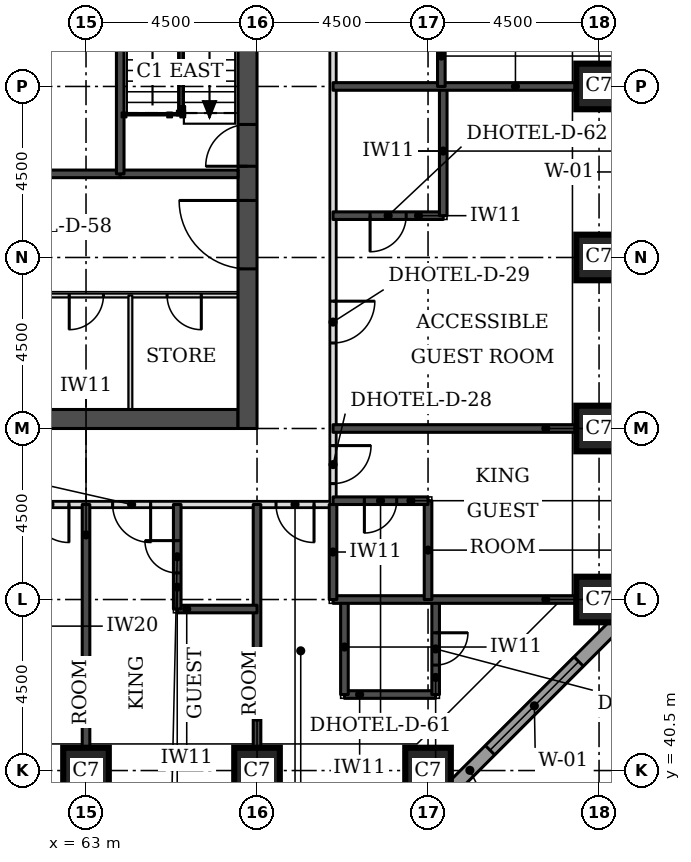
"""IFC4 building model, lengths in metres.
Left out: names, types, materials, properties, quantities, classifications, styles, units other than length and angle.
Written with IfcOpenShell. Run it as: python <this file> out.ifc"""

import sys

from ifc_helpers import new_model, si_unit, direction, frame, frame_2d, origin, origin_2d, place, context, subcontext, project, spatial, rectangle, extrude, element, fill, save


model = new_model("IFC4")
c1 = context("Model", 3, precision=1e-05, world=origin(), true_north=direction((0.0, 1.0)))
c2 = subcontext(c1, "Body", "Model", "MODEL_VIEW")
j1 = project(units=[si_unit("LENGTHUNIT", "METRE"), si_unit("PLANEANGLEUNIT", "RADIAN")], contexts=[c1])
p1 = place(None, origin())
s1 = spatial("IfcSite", under=j1, at=p1, CompositionType="ELEMENT")
p2 = place(p1, origin())
s2 = spatial("IfcBuilding", under=s1, at=p2, CompositionType="ELEMENT")
p3 = place(p2, frame((0.0, 0.0, 59.4)))
s3 = spatial("IfcBuildingStorey", under=s2, at=p3, CompositionType="ELEMENT", Elevation=59.4)
for number, where, z_axis, x_axis in (
    (1, (63.0, 40.5, 0.0), (0.0, 0.0, 1.0), (1.0, 0.0, 0.0)),
    (2, (67.5, 40.5, 0.0), (0.0, 0.0, 1.0), (1.0, 0.0, 0.0)),
    (3, (72.0, 40.5, 0.0), (0.0, 0.0, 1.0), (1.0, 0.0, 0.0)),
    (4, (76.5, 45.0, 0.0), (0.0, 0.0, 1.0), (1.0, 0.0, 0.0)),
    (5, (76.5, 49.5, 0.0), (0.0, 0.0, 1.0), (1.0, 0.0, 0.0)),
    (6, (76.5, 54.0, 0.0), (0.0, 0.0, 1.0), (1.0, 0.0, 0.0)),
    (7, (76.5, 58.5, 0.0), (0.0, 0.0, 1.0), (1.0, 0.0, 0.0)),
):
    element("IfcColumn", number, at=place(p3, frame(where, z_axis=z_axis, x_axis=x_axis)), inside=s3, PredefinedType="COLUMN", context=c2, shape_type="SweptSolid", body=[
        extrude(rectangle(XDim=1.2, YDim=1.2, at=origin_2d()), origin(), (0.0, 0.0, 1.0), 3.3),
    ])
p4 = place(p3, frame((45.5, 49.75, 0.0), z_axis=(0.0, 0.0, 1.0), x_axis=(1.0, 0.0, 0.0)))
e8 = element("IfcWall", 8, at=p4, inside=s3, PredefinedType="SHEAR", context=c2, shape_type="SweptSolid", body=[
    extrude(rectangle(XDim=21.5, YDim=0.5, at=frame_2d((10.75, 0.0))), origin(), (0.0, 0.0, 1.0), 3.3),
])
p5 = place(p3, frame((67.25, 49.5, 0.0), z_axis=(0.0, 0.0, 1.0), x_axis=(0.0, 1.0, 0.0)))
e9 = element("IfcWall", 9, at=p5, inside=s3, PredefinedType="SHEAR", context=c2, shape_type="SweptSolid", body=[
    extrude(rectangle(XDim=22.5, YDim=0.5, at=frame_2d((11.25, 0.0))), origin(), (0.0, 0.0, 1.0), 3.3),
])
p6 = place(p5, frame((4.2, 0.0, 0.0)))
e10 = element("IfcOpeningElement", 10, at=p6, cuts=e9, PredefinedType="OPENING", context=c2, shape_type="SweptSolid", body=[
    extrude(rectangle(XDim=1.8, YDim=2.1, at=frame_2d((0.9, 1.05))), frame((0.0, 0.26, 0.0), z_axis=(0.0, -1.0, 0.0), x_axis=(1.0, 0.0, 0.0)), (0.0, 0.0, 1.0), 0.52),
])
p7 = place(p5, frame((6.9, 0.0, 0.0)))
e11 = element("IfcOpeningElement", 11, at=p7, cuts=e9, PredefinedType="OPENING", context=c2, shape_type="SweptSolid", body=[
    extrude(rectangle(XDim=1.1, YDim=2.1, at=frame_2d((0.55, 1.05))), frame((0.0, 0.26, 0.0), z_axis=(0.0, -1.0, 0.0), x_axis=(1.0, 0.0, 0.0)), (0.0, 0.0, 1.0), 0.52),
])
p8 = place(p5, frame((13.6, 0.0, 0.0)))
e12 = element("IfcOpeningElement", 12, at=p8, cuts=e9, PredefinedType="OPENING", context=c2, shape_type="SweptSolid", body=[
    extrude(rectangle(XDim=1.1, YDim=2.1, at=frame_2d((0.55, 1.05))), frame((0.0, 0.26, 0.0), z_axis=(0.0, -1.0, 0.0), x_axis=(1.0, 0.0, 0.0)), (0.0, 0.0, 1.0), 0.52),
])
p9 = place(p5, frame((16.5, 0.0, 0.0)))
e13 = element("IfcOpeningElement", 13, at=p9, cuts=e9, PredefinedType="OPENING", context=c2, shape_type="SweptSolid", body=[
    extrude(rectangle(XDim=1.8, YDim=2.1, at=frame_2d((0.9, 1.05))), frame((0.0, 0.26, 0.0), z_axis=(0.0, -1.0, 0.0), x_axis=(1.0, 0.0, 0.0)), (0.0, 0.0, 1.0), 0.52),
])
p10 = place(p3, frame((72.27, 39.674, 0.0), z_axis=(0.0, 0.0, 1.0), x_axis=(0.707106781187, 0.707106781187, 0.0)))
e14 = element("IfcWall", 14, at=p10, inside=s3, PredefinedType="STANDARD", context=c2, shape_type="SweptSolid", body=[
    extrude(rectangle(XDim=7.151, YDim=0.35, at=frame_2d((3.576, 0.0))), origin(), (0.0, 0.0, 1.0), 3.055),
])
p11 = place(p10, frame((1.926, 0.0, 0.8)))
e15 = element("IfcOpeningElement", 15, at=p11, cuts=e14, PredefinedType="OPENING", context=c2, shape_type="SweptSolid", body=[
    extrude(rectangle(XDim=3.3, YDim=1.5, at=frame_2d((1.65, 0.75))), frame((0.0, 0.185, 0.0), z_axis=(0.0, -1.0, 0.0), x_axis=(1.0, 0.0, 0.0)), (0.0, 0.0, 1.0), 0.37),
])
p12 = place(p3, frame((51.5, 47.5, 0.0), z_axis=(0.0, 0.0, 1.0), x_axis=(1.0, 0.0, 0.0)))
e16 = element("IfcWall", 16, at=p12, inside=s3, PredefinedType="PARTITIONING", context=c2, shape_type="SweptSolid", body=[
    extrude(rectangle(XDim=18.0, YDim=0.15, at=frame_2d((9.0, 0.0))), origin(), (0.0, 0.0, 1.0), 3.08),
])
p13 = place(p12, frame((12.2, 0.0, 0.0)))
e17 = element("IfcOpeningElement", 17, at=p13, cuts=e16, PredefinedType="OPENING", context=c2, shape_type="SweptSolid", body=[
    extrude(rectangle(XDim=1.0, YDim=2.1, at=frame_2d((0.5, 1.05))), frame((0.0, 0.085, 0.0), z_axis=(0.0, -1.0, 0.0), x_axis=(1.0, 0.0, 0.0)), (0.0, 0.0, 1.0), 0.17),
])
p14 = place(p12, frame((10.05, 0.0, 0.0)))
e18 = element("IfcOpeningElement", 18, at=p14, cuts=e16, PredefinedType="OPENING", context=c2, shape_type="SweptSolid", body=[
    extrude(rectangle(XDim=1.0, YDim=2.1, at=frame_2d((0.5, 1.05))), frame((0.0, 0.085, 0.0), z_axis=(0.0, -1.0, 0.0), x_axis=(1.0, 0.0, 0.0)), (0.0, 0.0, 1.0), 0.17),
])
p15 = place(p12, frame((16.5, 0.0, 0.0)))
e19 = element("IfcOpeningElement", 19, at=p15, cuts=e16, PredefinedType="OPENING", context=c2, shape_type="SweptSolid", body=[
    extrude(rectangle(XDim=1.0, YDim=2.1, at=frame_2d((0.5, 1.05))), frame((0.0, 0.085, 0.0), z_axis=(0.0, -1.0, 0.0), x_axis=(1.0, 0.0, 0.0)), (0.0, 0.0, 1.0), 0.17),
])
p16 = place(p3, frame((69.5, 47.5, 0.0), z_axis=(0.0, 0.0, 1.0), x_axis=(0.0, 1.0, 0.0)))
e20 = element("IfcWall", 20, at=p16, inside=s3, PredefinedType="PARTITIONING", context=c2, shape_type="SweptSolid", body=[
    extrude(rectangle(XDim=26.5, YDim=0.15, at=frame_2d((13.25, 0.0))), origin(), (0.0, 0.0, 1.0), 3.08),
])
p17 = place(p16, frame((22.65, 0.0, 0.0)))
e21 = element("IfcOpeningElement", 21, at=p17, cuts=e20, PredefinedType="OPENING", context=c2, shape_type="SweptSolid", body=[
    extrude(rectangle(XDim=1.0, YDim=2.1, at=frame_2d((0.5, 1.05))), frame((0.0, 0.085, 0.0), z_axis=(0.0, -1.0, 0.0), x_axis=(1.0, 0.0, 0.0)), (0.0, 0.0, 1.0), 0.17),
])
p18 = place(p16, frame((16.6, 0.0, 0.0)))
e22 = element("IfcOpeningElement", 22, at=p18, cuts=e20, PredefinedType="OPENING", context=c2, shape_type="SweptSolid", body=[
    extrude(rectangle(XDim=1.0, YDim=2.1, at=frame_2d((0.5, 1.05))), frame((0.0, 0.085, 0.0), z_axis=(0.0, -1.0, 0.0), x_axis=(1.0, 0.0, 0.0)), (0.0, 0.0, 1.0), 0.17),
])
p19 = place(p16, frame((4.25, 0.0, 0.0)))
e23 = element("IfcOpeningElement", 23, at=p19, cuts=e20, PredefinedType="OPENING", context=c2, shape_type="SweptSolid", body=[
    extrude(rectangle(XDim=1.1, YDim=2.1, at=frame_2d((0.55, 1.05))), frame((0.0, 0.085, 0.0), z_axis=(0.0, -1.0, 0.0), x_axis=(1.0, 0.0, 0.0)), (0.0, 0.0, 1.0), 0.17),
])
p20 = place(p16, frame((0.55, 0.0, 0.0)))
e24 = element("IfcOpeningElement", 24, at=p20, cuts=e20, PredefinedType="OPENING", context=c2, shape_type="SweptSolid", body=[
    extrude(rectangle(XDim=1.0, YDim=2.1, at=frame_2d((0.5, 1.05))), frame((0.0, 0.085, 0.0), z_axis=(0.0, -1.0, 0.0), x_axis=(1.0, 0.0, 0.0)), (0.0, 0.0, 1.0), 0.17),
])
for number, where, z_axis, x_axis in (
    (25, (63.0, 41.1, 0.0), (0.0, 0.0, 1.0), (0.0, 1.0, 0.0)),
    (26, (67.5, 41.1, 0.0), (0.0, 0.0, 1.0), (0.0, 1.0, 0.0)),
):
    element("IfcWall", number, at=place(p3, frame(where, z_axis=z_axis, x_axis=x_axis)), inside=s3, PredefinedType="SOLIDWALL", context=c2, shape_type="SweptSolid", body=[
        extrude(rectangle(XDim=6.4, YDim=0.2, at=frame_2d((3.2, 0.0))), origin(), (0.0, 0.0, 1.0), 3.08),
    ])
p21 = place(p3, frame((69.8, 42.5, 0.0), z_axis=(0.0, 0.0, 1.0), x_axis=(1.0, 0.0, 0.0)))
e27 = element("IfcWall", 27, at=p21, inside=s3, PredefinedType="SOLIDWALL", context=c2, shape_type="SweptSolid", body=[
    extrude(rectangle(XDim=2.4, YDim=0.2, at=frame_2d((1.2, 0.0))), origin(), (0.0, 0.0, 1.0), 3.08),
])
p22 = place(p3, frame((69.8, 42.5, 0.0), z_axis=(0.0, 0.0, 1.0), x_axis=(0.0, 1.0, 0.0)))
e28 = element("IfcWall", 28, at=p22, inside=s3, PredefinedType="SOLIDWALL", context=c2, shape_type="SweptSolid", body=[
    extrude(rectangle(XDim=2.5, YDim=0.2, at=frame_2d((1.25, 0.0))), origin(), (0.0, 0.0, 1.0), 3.08),
])
p23 = place(p3, frame((72.2, 42.5, 0.0), z_axis=(0.0, 0.0, 1.0), x_axis=(0.0, 1.0, 0.0)))
e29 = element("IfcWall", 29, at=p23, inside=s3, PredefinedType="SOLIDWALL", context=c2, shape_type="SweptSolid", body=[
    extrude(rectangle(XDim=2.5, YDim=0.2, at=frame_2d((1.25, 0.0))), origin(), (0.0, 0.0, 1.0), 3.08),
])
p24 = place(p23, frame((0.775, 0.0, 0.0)))
e30 = element("IfcOpeningElement", 30, at=p24, cuts=e29, PredefinedType="OPENING", context=c2, shape_type="SweptSolid", body=[
    extrude(rectangle(XDim=0.85, YDim=2.1, at=frame_2d((0.425, 1.05))), frame((0.0, 0.11, 0.0), z_axis=(0.0, -1.0, 0.0), x_axis=(1.0, 0.0, 0.0)), (0.0, 0.0, 1.0), 0.22),
])
p25 = place(p3, frame((65.4, 44.75, 0.0), z_axis=(0.0, 0.0, 1.0), x_axis=(1.0, 0.0, 0.0)))
e31 = element("IfcWall", 31, at=p25, inside=s3, PredefinedType="SOLIDWALL", context=c2, shape_type="SweptSolid", body=[
    extrude(rectangle(XDim=2.1, YDim=0.2, at=frame_2d((1.05, 0.0))), origin(), (0.0, 0.0, 1.0), 3.08),
])
p26 = place(p3, frame((65.4, 44.75, 0.0), z_axis=(0.0, 0.0, 1.0), x_axis=(0.0, 1.0, 0.0)))
e32 = element("IfcWall", 32, at=p26, inside=s3, PredefinedType="SOLIDWALL", context=c2, shape_type="SweptSolid", body=[
    extrude(rectangle(XDim=2.75, YDim=0.2, at=frame_2d((1.375, 0.0))), origin(), (0.0, 0.0, 1.0), 3.08),
])
p27 = place(p26, frame((0.95, 0.0, 0.0)))
e33 = element("IfcOpeningElement", 33, at=p27, cuts=e32, PredefinedType="OPENING", context=c2, shape_type="SweptSolid", body=[
    extrude(rectangle(XDim=0.85, YDim=2.1, at=frame_2d((0.425, 1.05))), frame((0.0, 0.11, 0.0), z_axis=(0.0, -1.0, 0.0), x_axis=(1.0, 0.0, 0.0)), (0.0, 0.0, 1.0), 0.22),
])
p28 = place(p3, frame((69.5, 45.0, 0.0), z_axis=(0.0, 0.0, 1.0), x_axis=(1.0, 0.0, 0.0)))
e34 = element("IfcWall", 34, at=p28, inside=s3, PredefinedType="SOLIDWALL", context=c2, shape_type="SweptSolid", body=[
    extrude(rectangle(XDim=6.4, YDim=0.2, at=frame_2d((3.2, 0.0))), origin(), (0.0, 0.0, 1.0), 3.08),
])
p29 = place(p3, frame((69.5, 45.0, 0.0), z_axis=(0.0, 0.0, 1.0), x_axis=(0.0, 1.0, 0.0)))
e35 = element("IfcWall", 35, at=p29, inside=s3, PredefinedType="SOLIDWALL", context=c2, shape_type="SweptSolid", body=[
    extrude(rectangle(XDim=2.5, YDim=0.2, at=frame_2d((1.25, 0.0))), origin(), (0.0, 0.0, 1.0), 3.08),
])
p30 = place(p3, frame((72.0, 45.0, 0.0), z_axis=(0.0, 0.0, 1.0), x_axis=(0.0, 1.0, 0.0)))
e36 = element("IfcWall", 36, at=p30, inside=s3, PredefinedType="SOLIDWALL", context=c2, shape_type="SweptSolid", body=[
    extrude(rectangle(XDim=2.6, YDim=0.2, at=frame_2d((1.3, 0.0))), origin(), (0.0, 0.0, 1.0), 3.08),
])
p31 = place(p3, frame((69.5, 47.6, 0.0), z_axis=(0.0, 0.0, 1.0), x_axis=(1.0, 0.0, 0.0)))
e37 = element("IfcWall", 37, at=p31, inside=s3, PredefinedType="SOLIDWALL", context=c2, shape_type="SweptSolid", body=[
    extrude(rectangle(XDim=2.5, YDim=0.2, at=frame_2d((1.25, 0.0))), origin(), (0.0, 0.0, 1.0), 3.08),
])
p32 = place(p31, frame((0.825, 0.0, 0.0)))
e38 = element("IfcOpeningElement", 38, at=p32, cuts=e37, PredefinedType="OPENING", context=c2, shape_type="SweptSolid", body=[
    extrude(rectangle(XDim=0.85, YDim=2.1, at=frame_2d((0.425, 1.05))), frame((0.0, 0.11, 0.0), z_axis=(0.0, -1.0, 0.0), x_axis=(1.0, 0.0, 0.0)), (0.0, 0.0, 1.0), 0.22),
])
p33 = place(p3, frame((69.5, 49.5, 0.0), z_axis=(0.0, 0.0, 1.0), x_axis=(1.0, 0.0, 0.0)))
e39 = element("IfcWall", 39, at=p33, inside=s3, PredefinedType="SOLIDWALL", context=c2, shape_type="SweptSolid", body=[
    extrude(rectangle(XDim=6.4, YDim=0.2, at=frame_2d((3.2, 0.0))), origin(), (0.0, 0.0, 1.0), 3.08),
])
p34 = place(p3, frame((69.5, 55.1, 0.0), z_axis=(0.0, 0.0, 1.0), x_axis=(1.0, 0.0, 0.0)))
e40 = element("IfcWall", 40, at=p34, inside=s3, PredefinedType="SOLIDWALL", context=c2, shape_type="SweptSolid", body=[
    extrude(rectangle(XDim=2.9, YDim=0.2, at=frame_2d((1.45, 0.0))), origin(), (0.0, 0.0, 1.0), 3.08),
])
p35 = place(p34, frame((0.975, 0.0, 0.0)))
e41 = element("IfcOpeningElement", 41, at=p35, cuts=e40, PredefinedType="OPENING", context=c2, shape_type="SweptSolid", body=[
    extrude(rectangle(XDim=0.95, YDim=2.1, at=frame_2d((0.475, 1.05))), frame((0.0, 0.11, 0.0), z_axis=(0.0, -1.0, 0.0), x_axis=(1.0, 0.0, 0.0)), (0.0, 0.0, 1.0), 0.22),
])
p36 = place(p3, frame((72.4, 55.1, 0.0), z_axis=(0.0, 0.0, 1.0), x_axis=(0.0, 1.0, 0.0)))
e42 = element("IfcWall", 42, at=p36, inside=s3, PredefinedType="SOLIDWALL", context=c2, shape_type="SweptSolid", body=[
    extrude(rectangle(XDim=3.4, YDim=0.2, at=frame_2d((1.7, 0.0))), origin(), (0.0, 0.0, 1.0), 3.08),
])
p37 = place(p3, frame((69.5, 58.5, 0.0), z_axis=(0.0, 0.0, 1.0), x_axis=(1.0, 0.0, 0.0)))
e43 = element("IfcWall", 43, at=p37, inside=s3, PredefinedType="SOLIDWALL", context=c2, shape_type="SweptSolid", body=[
    extrude(rectangle(XDim=6.4, YDim=0.2, at=frame_2d((3.2, 0.0))), origin(), (0.0, 0.0, 1.0), 3.08),
])
p38 = place(p3, frame((72.35, 58.5, 0.0), z_axis=(0.0, 0.0, 1.0), x_axis=(0.0, 1.0, 0.0)))
e44 = element("IfcWall", 44, at=p38, inside=s3, PredefinedType="SOLIDWALL", context=c2, shape_type="SweptSolid", body=[
    extrude(rectangle(XDim=3.2, YDim=0.2, at=frame_2d((1.6, 0.0))), origin(), (0.0, 0.0, 1.0), 3.08),
])
p39 = place(p3, frame((61.85, 53.0, 0.0), z_axis=(0.0, 0.0, 1.0), x_axis=(1.0, 0.0, 0.0)))
e45 = element("IfcWall", 45, at=p39, inside=s3, PredefinedType="PARTITIONING", context=c2, shape_type="SweptSolid", body=[
    extrude(rectangle(XDim=5.15, YDim=0.1, at=frame_2d((2.575, 0.0))), origin(), (0.0, 0.0, 1.0), 3.08),
])
p40 = place(p39, frame((3.284, 0.0, 0.0)))
e46 = element("IfcOpeningElement", 46, at=p40, cuts=e45, PredefinedType="OPENING", context=c2, shape_type="SweptSolid", body=[
    extrude(rectangle(XDim=0.9, YDim=2.1, at=frame_2d((0.45, 1.05))), frame((0.0, 0.06, 0.0), z_axis=(0.0, -1.0, 0.0), x_axis=(1.0, 0.0, 0.0)), (0.0, 0.0, 1.0), 0.12),
])
p41 = place(p39, frame((0.709, 0.0, 0.0)))
e47 = element("IfcOpeningElement", 47, at=p41, cuts=e45, PredefinedType="OPENING", context=c2, shape_type="SweptSolid", body=[
    extrude(rectangle(XDim=0.9, YDim=2.1, at=frame_2d((0.45, 1.05))), frame((0.0, 0.06, 0.0), z_axis=(0.0, -1.0, 0.0), x_axis=(1.0, 0.0, 0.0)), (0.0, 0.0, 1.0), 0.12),
])
p42 = place(p3, frame((61.85, 56.2, 0.0), z_axis=(0.0, 0.0, 1.0), x_axis=(1.0, 0.0, 0.0)))
e48 = element("IfcWall", 48, at=p42, inside=s3, PredefinedType="SOLIDWALL", context=c2, shape_type="SweptSolid", body=[
    extrude(rectangle(XDim=2.05, YDim=0.2, at=frame_2d((1.025, 0.0))), origin(), (0.0, 0.0, 1.0), 3.08),
])
p43 = place(p3, frame((63.9, 56.2, 0.0), z_axis=(0.0, 0.0, 1.0), x_axis=(1.0, 0.0, 0.0)))
e49 = element("IfcWall", 49, at=p43, inside=s3, PredefinedType="SOLIDWALL", context=c2, shape_type="SweptSolid", body=[
    extrude(rectangle(XDim=3.1, YDim=0.2, at=frame_2d((1.55, 0.0))), origin(), (0.0, 0.0, 1.0), 3.08),
])
p44 = place(p3, frame((63.9, 56.2, 0.0), z_axis=(0.0, 0.0, 1.0), x_axis=(0.0, 1.0, 0.0)))
e50 = element("IfcWall", 50, at=p44, inside=s3, PredefinedType="SOLIDWALL", context=c2, shape_type="SweptSolid", body=[
    extrude(rectangle(XDim=5.8, YDim=0.2, at=frame_2d((2.9, 0.0))), origin(), (0.0, 0.0, 1.0), 3.08),
])
p45 = place(p3, frame((64.167, 50.0, 0.0), z_axis=(0.0, 0.0, 1.0), x_axis=(0.0, 1.0, 0.0)))
e51 = element("IfcWall", 51, at=p45, inside=s3, PredefinedType="PARTITIONING", context=c2, shape_type="SweptSolid", body=[
    extrude(rectangle(XDim=3.0, YDim=0.1, at=frame_2d((1.5, 0.0))), origin(), (0.0, 0.0, 1.0), 3.08),
])
p46 = place(p11, origin())
e52 = element("IfcWindow", 52, at=p46, inside=s3, PartitioningType="SINGLE_PANEL", PredefinedType="WINDOW", context=c2, shape_type="SweptSolid", body=[
    extrude(rectangle(XDim=3.3, YDim=1.5, at=frame_2d((1.65, 0.75))), frame((0.0, 0.085, 0.0), z_axis=(0.0, -1.0, 0.0), x_axis=(1.0, 0.0, 0.0)), (0.0, 0.0, 1.0), 0.06),
])
fill(e15, e52)
p47 = place(p19, frame((1.1, 0.0, 0.0), z_axis=(0.0, 0.0, 1.0), x_axis=(-1.0, 0.0, 0.0)))
e53 = element("IfcDoor", 53, at=p47, inside=s3, OperationType="SINGLE_SWING_LEFT", PredefinedType="DOOR", context=c2, shape_type="SweptSolid", body=[
    extrude(rectangle(XDim=1.1, YDim=2.1, at=frame_2d((0.55, 1.05))), frame((0.0, 0.025, 0.0), z_axis=(0.0, -1.0, 0.0), x_axis=(1.0, 0.0, 0.0)), (0.0, 0.0, 1.0), 0.05),
])
fill(e23, e53)
p48 = place(p35, frame((0.95, 0.0, 0.0), z_axis=(0.0, 0.0, 1.0), x_axis=(-1.0, 0.0, 0.0)))
e54 = element("IfcDoor", 54, at=p48, inside=s3, OperationType="SINGLE_SWING_RIGHT", PredefinedType="DOOR", context=c2, shape_type="SweptSolid", body=[
    extrude(rectangle(XDim=0.95, YDim=2.1, at=frame_2d((0.475, 1.05))), frame((0.0, 0.025, 0.0), z_axis=(0.0, -1.0, 0.0), x_axis=(1.0, 0.0, 0.0)), (0.0, 0.0, 1.0), 0.05),
])
fill(e41, e54)
p49 = place(p20, frame((1.0, 0.0, 0.0), z_axis=(0.0, 0.0, 1.0), x_axis=(-1.0, 0.0, 0.0)))
e55 = element("IfcDoor", 55, at=p49, inside=s3, OperationType="SINGLE_SWING_LEFT", PredefinedType="DOOR", context=c2, shape_type="SweptSolid", body=[
    extrude(rectangle(XDim=1.0, YDim=2.1, at=frame_2d((0.5, 1.05))), frame((0.0, 0.025, 0.0), z_axis=(0.0, -1.0, 0.0), x_axis=(1.0, 0.0, 0.0)), (0.0, 0.0, 1.0), 0.05),
])
fill(e24, e55)
p50 = place(p32, frame((0.85, 0.0, 0.0), z_axis=(0.0, 0.0, 1.0), x_axis=(-1.0, 0.0, 0.0)))
e56 = element("IfcDoor", 56, at=p50, inside=s3, OperationType="SINGLE_SWING_RIGHT", PredefinedType="DOOR", context=c2, shape_type="SweptSolid", body=[
    extrude(rectangle(XDim=0.85, YDim=2.1, at=frame_2d((0.425, 1.05))), frame((0.0, 0.025, 0.0), z_axis=(0.0, -1.0, 0.0), x_axis=(1.0, 0.0, 0.0)), (0.0, 0.0, 1.0), 0.05),
])
fill(e38, e56)
p51 = place(p13, frame((1.0, 0.0, 0.0), z_axis=(0.0, 0.0, 1.0), x_axis=(-1.0, 0.0, 0.0)))
e57 = element("IfcDoor", 57, at=p51, inside=s3, OperationType="SINGLE_SWING_LEFT", PredefinedType="DOOR", context=c2, shape_type="SweptSolid", body=[
    extrude(rectangle(XDim=1.0, YDim=2.1, at=frame_2d((0.5, 1.05))), frame((0.0, 0.025, 0.0), z_axis=(0.0, -1.0, 0.0), x_axis=(1.0, 0.0, 0.0)), (0.0, 0.0, 1.0), 0.05),
])
fill(e17, e57)
p52 = place(p27, origin())
e58 = element("IfcDoor", 58, at=p52, inside=s3, OperationType="SINGLE_SWING_RIGHT", PredefinedType="DOOR", context=c2, shape_type="SweptSolid", body=[
    extrude(rectangle(XDim=0.85, YDim=2.1, at=frame_2d((0.425, 1.05))), frame((0.0, 0.025, 0.0), z_axis=(0.0, -1.0, 0.0), x_axis=(1.0, 0.0, 0.0)), (0.0, 0.0, 1.0), 0.05),
])
fill(e33, e58)
p53 = place(p14, frame((1.0, 0.0, 0.0), z_axis=(0.0, 0.0, 1.0), x_axis=(-1.0, 0.0, 0.0)))
e59 = element("IfcDoor", 59, at=p53, inside=s3, OperationType="SINGLE_SWING_LEFT", PredefinedType="DOOR", context=c2, shape_type="SweptSolid", body=[
    extrude(rectangle(XDim=1.0, YDim=2.1, at=frame_2d((0.5, 1.05))), frame((0.0, 0.025, 0.0), z_axis=(0.0, -1.0, 0.0), x_axis=(1.0, 0.0, 0.0)), (0.0, 0.0, 1.0), 0.05),
])
fill(e18, e59)
p54 = place(p15, frame((1.0, 0.0, 0.0), z_axis=(0.0, 0.0, 1.0), x_axis=(-1.0, 0.0, 0.0)))
e60 = element("IfcDoor", 60, at=p54, inside=s3, OperationType="SINGLE_SWING_LEFT", PredefinedType="DOOR", context=c2, shape_type="SweptSolid", body=[
    extrude(rectangle(XDim=1.0, YDim=2.1, at=frame_2d((0.5, 1.05))), frame((0.0, 0.025, 0.0), z_axis=(0.0, -1.0, 0.0), x_axis=(1.0, 0.0, 0.0)), (0.0, 0.0, 1.0), 0.05),
])
fill(e19, e60)
p55 = place(p24, frame((0.85, 0.0, 0.0), z_axis=(0.0, 0.0, 1.0), x_axis=(-1.0, 0.0, 0.0)))
e61 = element("IfcDoor", 61, at=p55, inside=s3, OperationType="SINGLE_SWING_LEFT", PredefinedType="DOOR", context=c2, shape_type="SweptSolid", body=[
    extrude(rectangle(XDim=0.85, YDim=2.1, at=frame_2d((0.425, 1.05))), frame((0.0, 0.025, 0.0), z_axis=(0.0, -1.0, 0.0), x_axis=(1.0, 0.0, 0.0)), (0.0, 0.0, 1.0), 0.05),
])
fill(e30, e61)
p56 = place(p6, origin())
e62 = element("IfcDoor", 62, at=p56, inside=s3, OperationType="SINGLE_SWING_RIGHT", PredefinedType="DOOR", context=c2, shape_type="SweptSolid", body=[
    extrude(rectangle(XDim=1.8, YDim=2.1, at=frame_2d((0.9, 1.05))), frame((0.0, 0.025, 0.0), z_axis=(0.0, -1.0, 0.0), x_axis=(1.0, 0.0, 0.0)), (0.0, 0.0, 1.0), 0.05),
])
fill(e10, e62)
p57 = place(p7, origin())
e63 = element("IfcDoor", 63, at=p57, inside=s3, OperationType="SINGLE_SWING_LEFT", PredefinedType="DOOR", context=c2, shape_type="SweptSolid", body=[
    extrude(rectangle(XDim=1.1, YDim=2.1, at=frame_2d((0.55, 1.05))), frame((0.0, 0.025, 0.0), z_axis=(0.0, -1.0, 0.0), x_axis=(1.0, 0.0, 0.0)), (0.0, 0.0, 1.0), 0.05),
])
fill(e11, e63)
p58 = place(p40, frame((0.9, 0.0, 0.0), z_axis=(0.0, 0.0, 1.0), x_axis=(-1.0, 0.0, 0.0)))
e64 = element("IfcDoor", 64, at=p58, inside=s3, OperationType="SINGLE_SWING_LEFT", PredefinedType="DOOR", context=c2, shape_type="SweptSolid", body=[
    extrude(rectangle(XDim=0.9, YDim=2.1, at=frame_2d((0.45, 1.05))), frame((0.0, 0.025, 0.0), z_axis=(0.0, -1.0, 0.0), x_axis=(1.0, 0.0, 0.0)), (0.0, 0.0, 1.0), 0.05),
])
fill(e46, e64)
p59 = place(p41, frame((0.9, 0.0, 0.0), z_axis=(0.0, 0.0, 1.0), x_axis=(-1.0, 0.0, 0.0)))
e65 = element("IfcDoor", 65, at=p59, inside=s3, OperationType="SINGLE_SWING_RIGHT", PredefinedType="DOOR", context=c2, shape_type="SweptSolid", body=[
    extrude(rectangle(XDim=0.9, YDim=2.1, at=frame_2d((0.45, 1.05))), frame((0.0, 0.025, 0.0), z_axis=(0.0, -1.0, 0.0), x_axis=(1.0, 0.0, 0.0)), (0.0, 0.0, 1.0), 0.05),
])
fill(e47, e65)
save(model, sys.argv[1])
